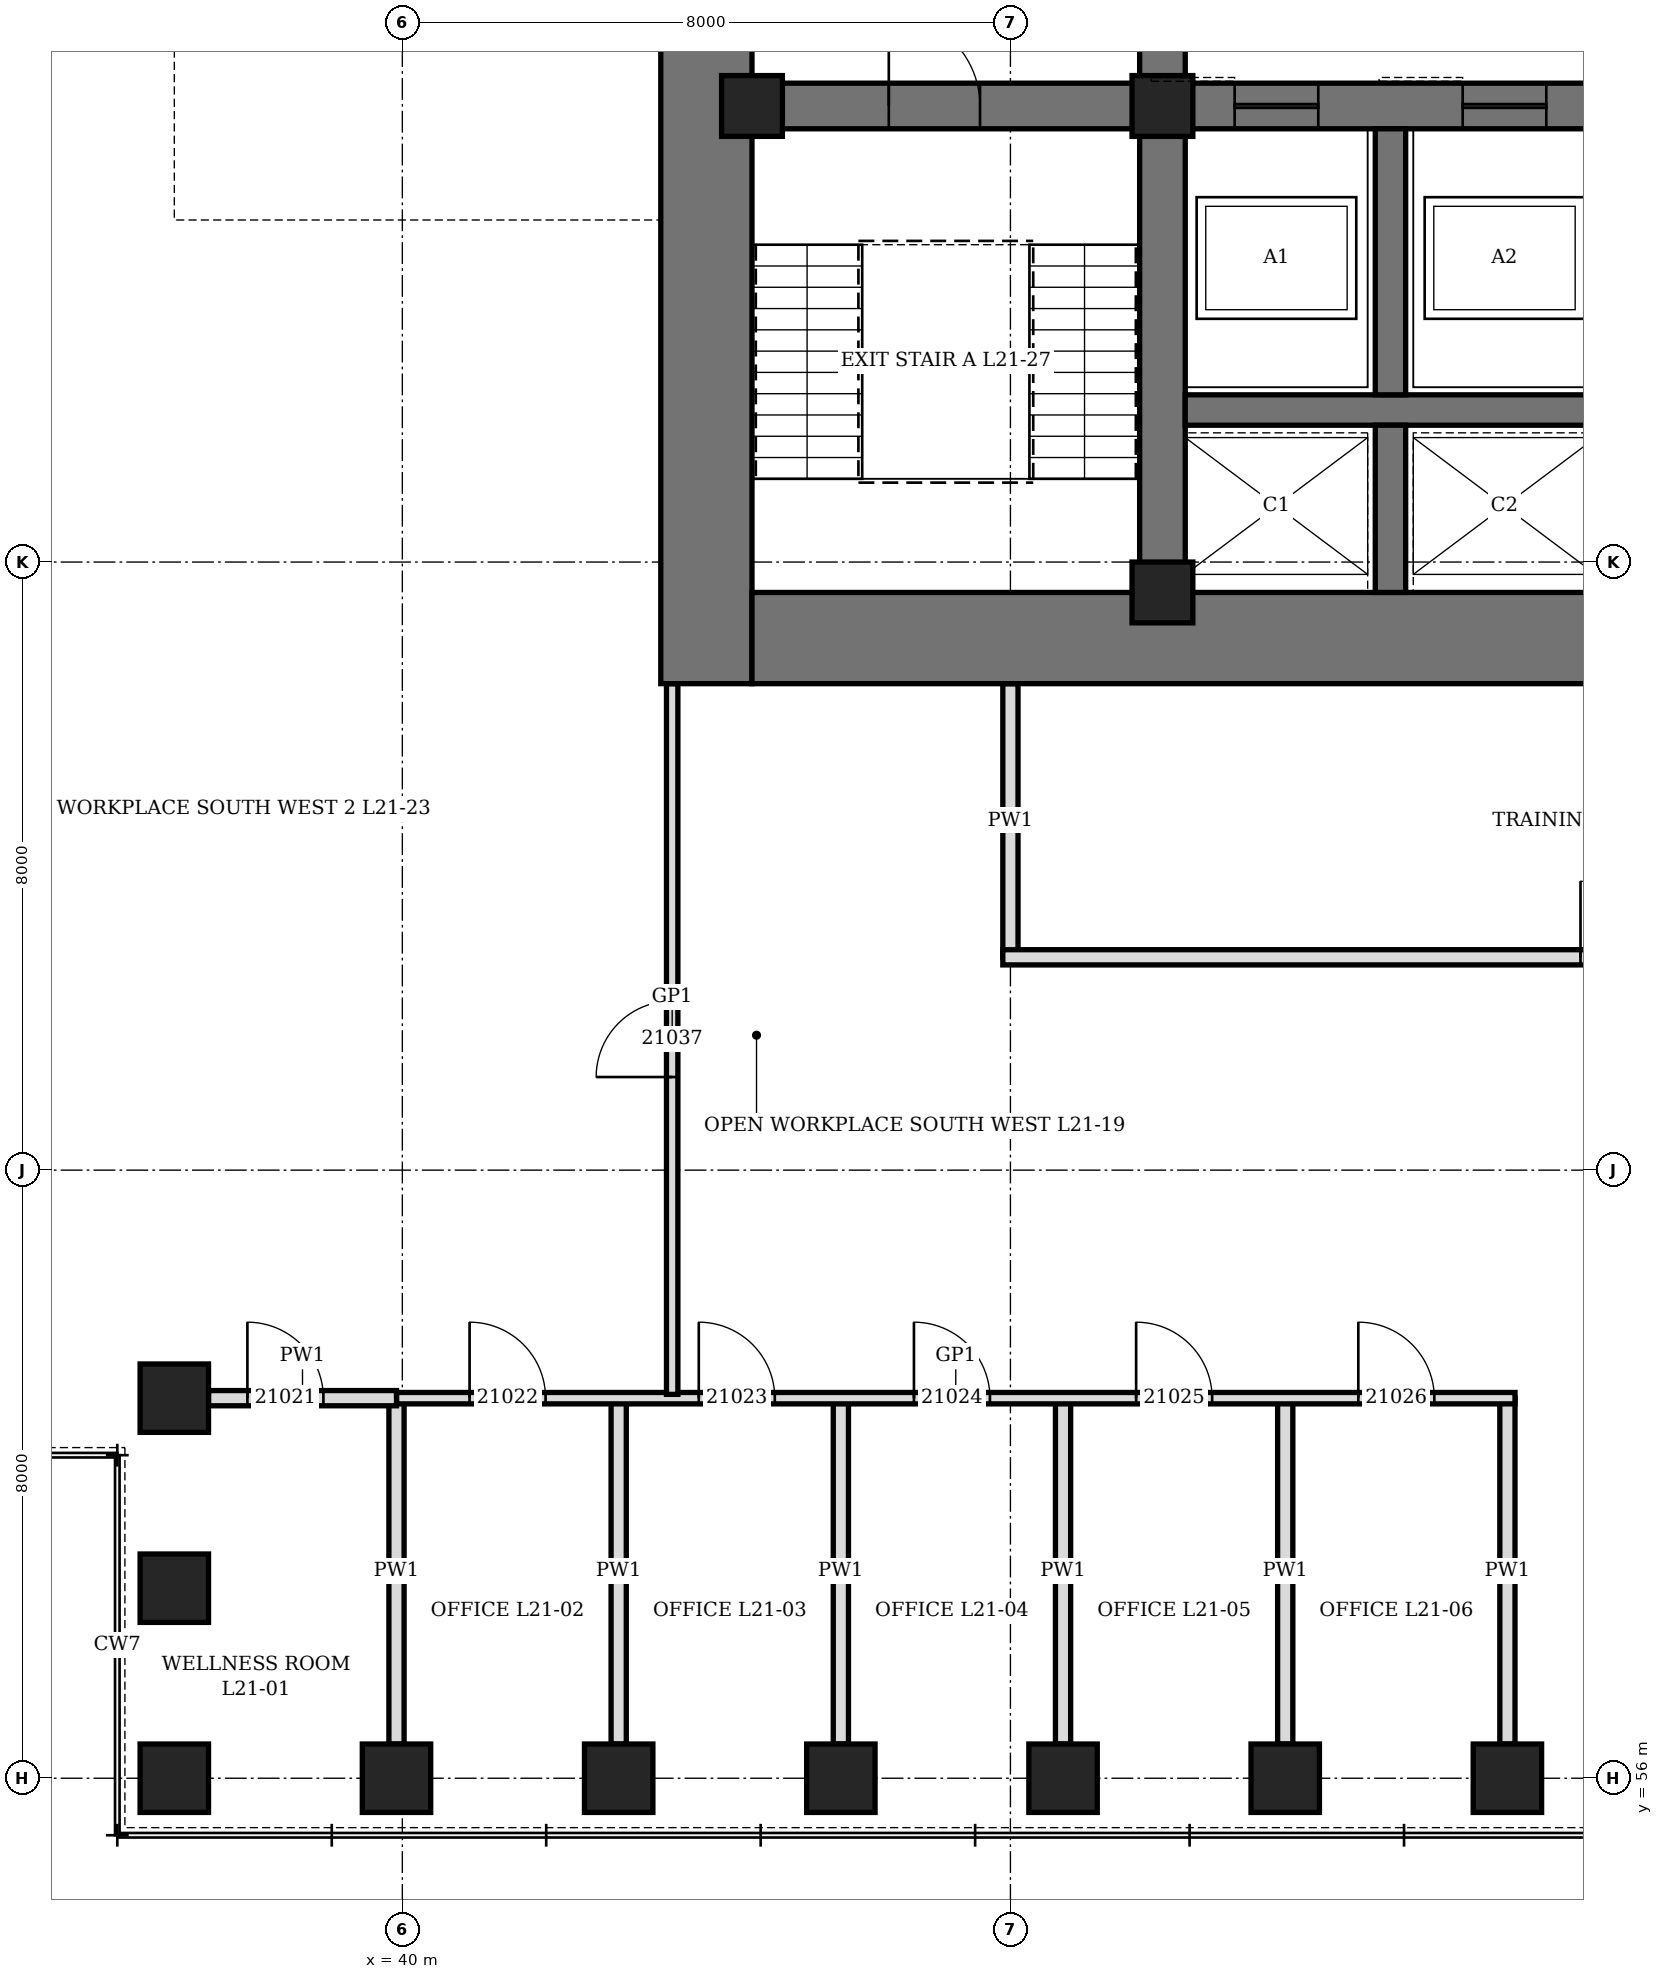
"""IFC4 building model, lengths in metres.
Left out: names, types, materials, properties, quantities, classifications, styles, units other than length and angle.
Written with IfcOpenShell. Run it as: python <this file> out.ifc"""

import sys

from ifc_helpers import new_model, si_unit, direction, frame, frame_2d, origin, origin_2d, place, context, subcontext, project, spatial, rectangle, hollow_rectangle, extrude, element, fill, save


model = new_model("IFC4")
c1 = context("Model", 3, precision=1e-05, world=origin(), true_north=direction((0.0, 1.0)))
c2 = subcontext(c1, "Body", "Model", "MODEL_VIEW")
j1 = project(units=[si_unit("LENGTHUNIT", "METRE"), si_unit("PLANEANGLEUNIT", "RADIAN")], contexts=[c1])
p1 = place(None, origin())
s1 = spatial("IfcSite", under=j1, at=p1, CompositionType="ELEMENT")
p2 = place(p1, origin())
s2 = spatial("IfcBuilding", under=s1, at=p2, CompositionType="ELEMENT")
p3 = place(p2, frame((0.0, 0.0, 97.9)))
s3 = spatial("IfcBuildingStorey", under=s2, at=p3, CompositionType="ELEMENT", Elevation=97.9)
for number, where, z_axis, x_axis in (
    (1, (37.0, 56.0, 0.0), (0.0, 0.0, 1.0), (1.0, 0.0, 0.0)),
    (2, (39.923, 56.0, 0.0), (0.0, 0.0, 1.0), (1.0, 0.0, 0.0)),
    (3, (42.846, 56.0, 0.0), (0.0, 0.0, 1.0), (1.0, 0.0, 0.0)),
    (4, (45.769, 56.0, 0.0), (0.0, 0.0, 1.0), (1.0, 0.0, 0.0)),
    (5, (48.692, 56.0, 0.0), (0.0, 0.0, 1.0), (1.0, 0.0, 0.0)),
    (6, (51.615, 56.0, 0.0), (0.0, 0.0, 1.0), (1.0, 0.0, 0.0)),
    (7, (54.539, 56.0, 0.0), (0.0, 0.0, 1.0), (1.0, 0.0, 0.0)),
    (8, (37.0, 61.0, 0.0), (0.0, 0.0, 1.0), (0.0, 1.0, 0.0)),
    (9, (37.0, 58.5, 0.0), (0.0, 0.0, 1.0), (0.0, 1.0, 0.0)),
):
    element("IfcColumn", number, at=place(p3, frame(where, z_axis=z_axis, x_axis=x_axis)), inside=s3, PredefinedType="COLUMN", context=c2, shape_type="SweptSolid", body=[
        extrude(hollow_rectangle(XDim=0.9, YDim=0.9, WallThickness=0.12, at=origin_2d()), origin(), (0.0, 0.0, 1.0), 4.2),
    ])
p4 = place(p3, frame((44.0, 70.4, 0.0), z_axis=(0.0, 0.0, 1.0), x_axis=(0.0, 1.0, 0.0)))
e10 = element("IfcWall", 10, at=p4, inside=s3, PredefinedType="SHEAR", context=c2, shape_type="SweptSolid", body=[
    extrude(rectangle(XDim=19.2, YDim=1.2, at=frame_2d((9.6, 0.0))), origin(), (0.0, 0.0, 1.0), 4.2),
])
p5 = place(p4, frame((8.6, 0.0, 0.0)))
e11 = element("IfcOpeningElement", 11, at=p5, cuts=e10, PredefinedType="OPENING", context=c2, shape_type="SweptSolid", body=[
    extrude(rectangle(XDim=2.0, YDim=2.4, at=frame_2d((1.0, 1.2))), frame((0.0, 0.61, 0.0), z_axis=(0.0, -1.0, 0.0), x_axis=(1.0, 0.0, 0.0)), (0.0, 0.0, 1.0), 1.22),
])
p6 = place(p3, frame((44.6, 71.0, 0.0), z_axis=(0.0, 0.0, 1.0), x_axis=(1.0, 0.0, 0.0)))
e12 = element("IfcWall", 12, at=p6, inside=s3, PredefinedType="SHEAR", context=c2, shape_type="SweptSolid", body=[
    extrude(rectangle(XDim=22.8, YDim=1.2, at=frame_2d((11.4, 0.0))), origin(), (0.0, 0.0, 1.0), 4.2),
])
p7 = place(p3, frame((50.0, 71.6, 0.0), z_axis=(0.0, 0.0, 1.0), x_axis=(0.0, 1.0, 0.0)))
e13 = element("IfcWall", 13, at=p7, inside=s3, PredefinedType="SHEAR", context=c2, shape_type="SweptSolid", body=[
    extrude(rectangle(XDim=16.8, YDim=0.6, at=frame_2d((8.4, 0.0))), origin(), (0.0, 0.0, 1.0), 4.2),
])
p8 = place(p7, frame((7.5, 0.0, 0.0)))
e14 = element("IfcOpeningElement", 14, at=p8, cuts=e13, PredefinedType="OPENING", context=c2, shape_type="SweptSolid", body=[
    extrude(rectangle(XDim=1.8, YDim=2.4, at=frame_2d((0.9, 1.2))), frame((0.0, 0.31, 0.0), z_axis=(0.0, -1.0, 0.0), x_axis=(1.0, 0.0, 0.0)), (0.0, 0.0, 1.0), 0.62),
])
p9 = place(p3, frame((44.6, 78.0, 0.0), z_axis=(0.0, 0.0, 1.0), x_axis=(1.0, 0.0, 0.0)))
e15 = element("IfcWall", 15, at=p9, inside=s3, PredefinedType="SHEAR", context=c2, shape_type="SweptSolid", body=[
    extrude(rectangle(XDim=5.1, YDim=0.6, at=frame_2d((2.55, 0.0))), origin(), (0.0, 0.0, 1.0), 4.2),
])
p10 = place(p9, frame((1.8, 0.0, 0.0)))
e16 = element("IfcOpeningElement", 16, at=p10, cuts=e15, PredefinedType="OPENING", context=c2, shape_type="SweptSolid", body=[
    extrude(rectangle(XDim=1.2, YDim=2.1, at=frame_2d((0.6, 1.05))), frame((0.0, 0.31, 0.0), z_axis=(0.0, -1.0, 0.0), x_axis=(1.0, 0.0, 0.0)), (0.0, 0.0, 1.0), 0.62),
])
p11 = place(p3, frame((50.3, 78.0, 0.0), z_axis=(0.0, 0.0, 1.0), x_axis=(1.0, 0.0, 0.0)))
e17 = element("IfcWall", 17, at=p11, inside=s3, PredefinedType="SHEAR", context=c2, shape_type="SweptSolid", body=[
    extrude(rectangle(XDim=11.4, YDim=0.6, at=frame_2d((5.7, 0.0))), origin(), (0.0, 0.0, 1.0), 4.2),
])
p12 = place(p11, frame((0.65, 0.0, 0.0)))
e18 = element("IfcOpeningElement", 18, at=p12, cuts=e17, PredefinedType="OPENING", context=c2, shape_type="SweptSolid", body=[
    extrude(rectangle(XDim=1.1, YDim=2.2, at=frame_2d((0.55, 1.1))), frame((0.0, 0.31, 0.0), z_axis=(0.0, -1.0, 0.0), x_axis=(1.0, 0.0, 0.0)), (0.0, 0.0, 1.0), 0.62),
])
p13 = place(p11, frame((3.65, 0.0, 0.0)))
e19 = element("IfcOpeningElement", 19, at=p13, cuts=e17, PredefinedType="OPENING", context=c2, shape_type="SweptSolid", body=[
    extrude(rectangle(XDim=1.1, YDim=2.2, at=frame_2d((0.55, 1.1))), frame((0.0, 0.31, 0.0), z_axis=(0.0, -1.0, 0.0), x_axis=(1.0, 0.0, 0.0)), (0.0, 0.0, 1.0), 0.62),
])
p14 = place(p11, frame((6.65, 0.0, 0.0)))
e20 = element("IfcOpeningElement", 20, at=p14, cuts=e17, PredefinedType="OPENING", context=c2, shape_type="SweptSolid", body=[
    extrude(rectangle(XDim=1.1, YDim=2.2, at=frame_2d((0.55, 1.1))), frame((0.0, 0.31, 0.0), z_axis=(0.0, -1.0, 0.0), x_axis=(1.0, 0.0, 0.0)), (0.0, 0.0, 1.0), 0.62),
])
p15 = place(p11, frame((9.65, 0.0, 0.0)))
e21 = element("IfcOpeningElement", 21, at=p15, cuts=e17, PredefinedType="OPENING", context=c2, shape_type="SweptSolid", body=[
    extrude(rectangle(XDim=1.1, YDim=2.2, at=frame_2d((0.55, 1.1))), frame((0.0, 0.31, 0.0), z_axis=(0.0, -1.0, 0.0), x_axis=(1.0, 0.0, 0.0)), (0.0, 0.0, 1.0), 0.62),
])
p16 = place(p3, frame((50.3, 74.0, 0.0), z_axis=(0.0, 0.0, 1.0), x_axis=(1.0, 0.0, 0.0)))
e22 = element("IfcWall", 22, at=p16, inside=s3, PredefinedType="SHEAR", context=c2, shape_type="SweptSolid", body=[
    extrude(rectangle(XDim=11.4, YDim=0.4, at=frame_2d((5.7, 0.0))), origin(), (0.0, 0.0, 1.0), 4.2),
])
p17 = place(p3, frame((53.0, 71.6, 0.0), z_axis=(0.0, 0.0, 1.0), x_axis=(0.0, 1.0, 0.0)))
e23 = element("IfcWall", 23, at=p17, inside=s3, PredefinedType="SHEAR", context=c2, shape_type="SweptSolid", body=[
    extrude(rectangle(XDim=2.2, YDim=0.4, at=frame_2d((1.1, 0.0))), origin(), (0.0, 0.0, 1.0), 4.2),
])
p18 = place(p3, frame((53.0, 74.2, 0.0), z_axis=(0.0, 0.0, 1.0), x_axis=(0.0, 1.0, 0.0)))
e24 = element("IfcWall", 24, at=p18, inside=s3, PredefinedType="SHEAR", context=c2, shape_type="SweptSolid", body=[
    extrude(rectangle(XDim=3.5, YDim=0.4, at=frame_2d((1.75, 0.0))), origin(), (0.0, 0.0, 1.0), 4.2),
])
for number, where, z_axis, x_axis in (
    (25, (44.6, 78.0, 0.0), (0.0, 0.0, 1.0), (1.0, 0.0, 0.0)),
    (26, (50.0, 71.6, 0.0), (0.0, 0.0, 1.0), (1.0, 0.0, 0.0)),
    (27, (50.0, 78.0, 0.0), (0.0, 0.0, 1.0), (1.0, 0.0, 0.0)),
):
    element("IfcColumn", number, at=place(p3, frame(where, z_axis=z_axis, x_axis=x_axis)), inside=s3, PredefinedType="COLUMN", context=c2, shape_type="SweptSolid", body=[
        extrude(hollow_rectangle(XDim=0.8, YDim=0.8, WallThickness=0.1, at=origin_2d()), origin(), (0.0, 0.0, 1.0), 4.2),
    ])
p19 = place(p3, frame((39.923, 56.45, 0.0), z_axis=(0.0, 0.0, 1.0), x_axis=(0.0, 1.0, 0.0)))
e28 = element("IfcWall", 28, at=p19, inside=s3, PredefinedType="PARTITIONING", context=c2, shape_type="SweptSolid", body=[
    extrude(rectangle(XDim=4.55, YDim=0.2, at=frame_2d((2.275, 0.0))), origin(), (0.0, 0.0, 1.0), 3.188),
])
for number, where, z_axis, x_axis in (
    (29, (42.846, 56.45, 0.0), (0.0, 0.0, 1.0), (0.0, 1.0, 0.0)),
    (30, (45.769, 56.45, 0.0), (0.0, 0.0, 1.0), (0.0, 1.0, 0.0)),
    (31, (48.692, 56.45, 0.0), (0.0, 0.0, 1.0), (0.0, 1.0, 0.0)),
    (32, (51.615, 56.45, 0.0), (0.0, 0.0, 1.0), (0.0, 1.0, 0.0)),
    (33, (54.539, 56.45, 0.0), (0.0, 0.0, 1.0), (0.0, 1.0, 0.0)),
):
    element("IfcWall", number, at=place(p3, frame(where, z_axis=z_axis, x_axis=x_axis)), inside=s3, PredefinedType="PARTITIONING", context=c2, shape_type="SweptSolid", body=[
        extrude(rectangle(XDim=4.55, YDim=0.2, at=frame_2d((2.275, 0.0))), origin(), (0.0, 0.0, 1.0), 1.95),
    ])
p20 = place(p3, frame((48.0, 66.8, 0.0), z_axis=(0.0, 0.0, 1.0), x_axis=(0.0, 1.0, 0.0)))
e34 = element("IfcWall", 34, at=p20, inside=s3, PredefinedType="PARTITIONING", context=c2, shape_type="SweptSolid", body=[
    extrude(rectangle(XDim=3.6, YDim=0.2, at=frame_2d((1.8, 0.0))), origin(), (0.0, 0.0, 1.0), 3.95),
])
p21 = place(p3, frame((39.923, 61.0, 0.0), z_axis=(0.0, 0.0, 1.0), x_axis=(1.0, 0.0, 0.0)))
e35 = element("IfcWall", 35, at=p21, inside=s3, PredefinedType="PARTITIONING", context=c2, shape_type="SweptSolid", body=[
    extrude(rectangle(XDim=14.715, YDim=0.15, at=frame_2d((7.358, 0.0))), origin(), (0.0, 0.0, 1.0), 3.95),
])
p22 = place(p21, frame((0.961, 0.0, 0.0)))
e36 = element("IfcOpeningElement", 36, at=p22, cuts=e35, PredefinedType="OPENING", context=c2, shape_type="SweptSolid", body=[
    extrude(rectangle(XDim=1.0, YDim=2.1, at=frame_2d((0.5, 1.05))), frame((0.0, 0.085, 0.0), z_axis=(0.0, -1.0, 0.0), x_axis=(1.0, 0.0, 0.0)), (0.0, 0.0, 1.0), 0.17),
])
p23 = place(p21, frame((3.977, 0.0, 0.0)))
e37 = element("IfcOpeningElement", 37, at=p23, cuts=e35, PredefinedType="OPENING", context=c2, shape_type="SweptSolid", body=[
    extrude(rectangle(XDim=1.0, YDim=2.1, at=frame_2d((0.5, 1.05))), frame((0.0, 0.085, 0.0), z_axis=(0.0, -1.0, 0.0), x_axis=(1.0, 0.0, 0.0)), (0.0, 0.0, 1.0), 0.17),
])
p24 = place(p21, frame((6.808, 0.0, 0.0)))
e38 = element("IfcOpeningElement", 38, at=p24, cuts=e35, PredefinedType="OPENING", context=c2, shape_type="SweptSolid", body=[
    extrude(rectangle(XDim=1.0, YDim=2.1, at=frame_2d((0.5, 1.05))), frame((0.0, 0.085, 0.0), z_axis=(0.0, -1.0, 0.0), x_axis=(1.0, 0.0, 0.0)), (0.0, 0.0, 1.0), 0.17),
])
p25 = place(p21, frame((9.731, 0.0, 0.0)))
e39 = element("IfcOpeningElement", 39, at=p25, cuts=e35, PredefinedType="OPENING", context=c2, shape_type="SweptSolid", body=[
    extrude(rectangle(XDim=1.0, YDim=2.1, at=frame_2d((0.5, 1.05))), frame((0.0, 0.085, 0.0), z_axis=(0.0, -1.0, 0.0), x_axis=(1.0, 0.0, 0.0)), (0.0, 0.0, 1.0), 0.17),
])
p26 = place(p21, frame((12.654, 0.0, 0.0)))
e40 = element("IfcOpeningElement", 40, at=p26, cuts=e35, PredefinedType="OPENING", context=c2, shape_type="SweptSolid", body=[
    extrude(rectangle(XDim=1.0, YDim=2.1, at=frame_2d((0.5, 1.05))), frame((0.0, 0.085, 0.0), z_axis=(0.0, -1.0, 0.0), x_axis=(1.0, 0.0, 0.0)), (0.0, 0.0, 1.0), 0.17),
])
p27 = place(p3, frame((37.45, 61.0, 0.0), z_axis=(0.0, 0.0, 1.0), x_axis=(1.0, 0.0, 0.0)))
e41 = element("IfcWall", 41, at=p27, inside=s3, PredefinedType="PARTITIONING", context=c2, shape_type="SweptSolid", body=[
    extrude(rectangle(XDim=2.473, YDim=0.2, at=frame_2d((1.237, 0.0))), origin(), (0.0, 0.0, 1.0), 3.95),
])
p28 = place(p27, frame((0.511, 0.0, 0.0)))
e42 = element("IfcOpeningElement", 42, at=p28, cuts=e41, PredefinedType="OPENING", context=c2, shape_type="SweptSolid", body=[
    extrude(rectangle(XDim=1.0, YDim=2.1, at=frame_2d((0.5, 1.05))), frame((0.0, 0.11, 0.0), z_axis=(0.0, -1.0, 0.0), x_axis=(1.0, 0.0, 0.0)), (0.0, 0.0, 1.0), 0.22),
])
p29 = place(p3, frame((47.9, 66.8, 0.0), z_axis=(0.0, 0.0, 1.0), x_axis=(1.0, 0.0, 0.0)))
e43 = element("IfcWall", 43, at=p29, inside=s3, PredefinedType="PARTITIONING", context=c2, shape_type="SweptSolid", body=[
    extrude(rectangle(XDim=16.2, YDim=0.2, at=frame_2d((8.1, 0.0))), origin(), (0.0, 0.0, 1.0), 3.95),
])
p30 = place(p29, frame((7.6, 0.0, 0.0)))
e44 = element("IfcOpeningElement", 44, at=p30, cuts=e43, PredefinedType="OPENING", context=c2, shape_type="SweptSolid", body=[
    extrude(rectangle(XDim=1.0, YDim=2.1, at=frame_2d((0.5, 1.05))), frame((0.0, 0.11, 0.0), z_axis=(0.0, -1.0, 0.0), x_axis=(1.0, 0.0, 0.0)), (0.0, 0.0, 1.0), 0.22),
])
p31 = place(p3, frame((43.55, 61.05, 0.0), z_axis=(0.0, 0.0, 1.0), x_axis=(0.0, 1.0, 0.0)))
e45 = element("IfcWall", 45, at=p31, inside=s3, PredefinedType="PARTITIONING", context=c2, shape_type="SweptSolid", body=[
    extrude(rectangle(XDim=9.35, YDim=0.15, at=frame_2d((4.675, 0.0))), origin(), (0.0, 0.0, 1.0), 3.95),
])
p32 = place(p31, frame((4.175, 0.0, 0.0)))
e46 = element("IfcOpeningElement", 46, at=p32, cuts=e45, PredefinedType="OPENING", context=c2, shape_type="SweptSolid", body=[
    extrude(rectangle(XDim=1.0, YDim=2.4, at=frame_2d((0.5, 1.2))), frame((0.0, 0.085, 0.0), z_axis=(0.0, -1.0, 0.0), x_axis=(1.0, 0.0, 0.0)), (0.0, 0.0, 1.0), 0.17),
])
p33 = place(p10, origin())
e47 = element("IfcDoor", 47, at=p33, inside=s3, OperationType="SINGLE_SWING_LEFT", PredefinedType="DOOR", context=c2, shape_type="SweptSolid", body=[
    extrude(rectangle(XDim=1.2, YDim=2.1, at=frame_2d((0.6, 1.05))), frame((0.0, 0.3, 0.0), z_axis=(0.0, -1.0, 0.0), x_axis=(1.0, 0.0, 0.0)), (0.0, 0.0, 1.0), 0.6),
])
fill(e16, e47)
p34 = place(p12, origin())
e48 = element("IfcDoor", 48, at=p34, inside=s3, OperationType="SLIDING_TO_LEFT", PredefinedType="DOOR", context=c2, shape_type="SweptSolid", body=[
    extrude(rectangle(XDim=1.1, YDim=2.2, at=frame_2d((0.55, 1.1))), frame((0.0, 0.3, 0.0), z_axis=(0.0, -1.0, 0.0), x_axis=(1.0, 0.0, 0.0)), (0.0, 0.0, 1.0), 0.6),
])
fill(e18, e48)
p35 = place(p13, origin())
e49 = element("IfcDoor", 49, at=p35, inside=s3, OperationType="SLIDING_TO_LEFT", PredefinedType="DOOR", context=c2, shape_type="SweptSolid", body=[
    extrude(rectangle(XDim=1.1, YDim=2.2, at=frame_2d((0.55, 1.1))), frame((0.0, 0.3, 0.0), z_axis=(0.0, -1.0, 0.0), x_axis=(1.0, 0.0, 0.0)), (0.0, 0.0, 1.0), 0.6),
])
fill(e19, e49)
p36 = place(p28, origin())
e50 = element("IfcDoor", 50, at=p36, inside=s3, OperationType="SINGLE_SWING_LEFT", PredefinedType="DOOR", context=c2, shape_type="SweptSolid", body=[
    extrude(rectangle(XDim=1.0, YDim=2.1, at=frame_2d((0.5, 1.05))), frame((0.0, 0.1, 0.0), z_axis=(0.0, -1.0, 0.0), x_axis=(1.0, 0.0, 0.0)), (0.0, 0.0, 1.0), 0.199),
])
fill(e42, e50)
p37 = place(p22, origin())
e51 = element("IfcDoor", 51, at=p37, inside=s3, OperationType="SINGLE_SWING_LEFT", PredefinedType="DOOR", context=c2, shape_type="SweptSolid", body=[
    extrude(rectangle(XDim=1.0, YDim=2.1, at=frame_2d((0.5, 1.05))), frame((0.0, 0.075, 0.0), z_axis=(0.0, -1.0, 0.0), x_axis=(1.0, 0.0, 0.0)), (0.0, 0.0, 1.0), 0.149),
])
fill(e36, e51)
p38 = place(p23, origin())
e52 = element("IfcDoor", 52, at=p38, inside=s3, OperationType="SINGLE_SWING_LEFT", PredefinedType="DOOR", context=c2, shape_type="SweptSolid", body=[
    extrude(rectangle(XDim=1.0, YDim=2.1, at=frame_2d((0.5, 1.05))), frame((0.0, 0.075, 0.0), z_axis=(0.0, -1.0, 0.0), x_axis=(1.0, 0.0, 0.0)), (0.0, 0.0, 1.0), 0.149),
])
fill(e37, e52)
p39 = place(p24, origin())
e53 = element("IfcDoor", 53, at=p39, inside=s3, OperationType="SINGLE_SWING_LEFT", PredefinedType="DOOR", context=c2, shape_type="SweptSolid", body=[
    extrude(rectangle(XDim=1.0, YDim=2.1, at=frame_2d((0.5, 1.05))), frame((0.0, 0.075, 0.0), z_axis=(0.0, -1.0, 0.0), x_axis=(1.0, 0.0, 0.0)), (0.0, 0.0, 1.0), 0.149),
])
fill(e38, e53)
p40 = place(p25, origin())
e54 = element("IfcDoor", 54, at=p40, inside=s3, OperationType="SINGLE_SWING_LEFT", PredefinedType="DOOR", context=c2, shape_type="SweptSolid", body=[
    extrude(rectangle(XDim=1.0, YDim=2.1, at=frame_2d((0.5, 1.05))), frame((0.0, 0.075, 0.0), z_axis=(0.0, -1.0, 0.0), x_axis=(1.0, 0.0, 0.0)), (0.0, 0.0, 1.0), 0.149),
])
fill(e39, e54)
p41 = place(p26, origin())
e55 = element("IfcDoor", 55, at=p41, inside=s3, OperationType="SINGLE_SWING_LEFT", PredefinedType="DOOR", context=c2, shape_type="SweptSolid", body=[
    extrude(rectangle(XDim=1.0, YDim=2.1, at=frame_2d((0.5, 1.05))), frame((0.0, 0.075, 0.0), z_axis=(0.0, -1.0, 0.0), x_axis=(1.0, 0.0, 0.0)), (0.0, 0.0, 1.0), 0.149),
])
fill(e40, e55)
p42 = place(p30, origin())
e56 = element("IfcDoor", 56, at=p42, inside=s3, OperationType="SINGLE_SWING_LEFT", PredefinedType="DOOR", context=c2, shape_type="SweptSolid", body=[
    extrude(rectangle(XDim=1.0, YDim=2.1, at=frame_2d((0.5, 1.05))), frame((0.0, 0.1, 0.0), z_axis=(0.0, -1.0, 0.0), x_axis=(1.0, 0.0, 0.0)), (0.0, 0.0, 1.0), 0.199),
])
fill(e44, e56)
p43 = place(p32, origin())
e57 = element("IfcDoor", 57, at=p43, inside=s3, OperationType="SINGLE_SWING_RIGHT", PredefinedType="DOOR", context=c2, shape_type="SweptSolid", body=[
    extrude(rectangle(XDim=1.0, YDim=2.4, at=frame_2d((0.5, 1.2))), frame((0.0, 0.075, 0.0), z_axis=(0.0, -1.0, 0.0), x_axis=(1.0, 0.0, 0.0)), (0.0, 0.0, 1.0), 0.149),
])
fill(e46, e57)
save(model, sys.argv[1])
